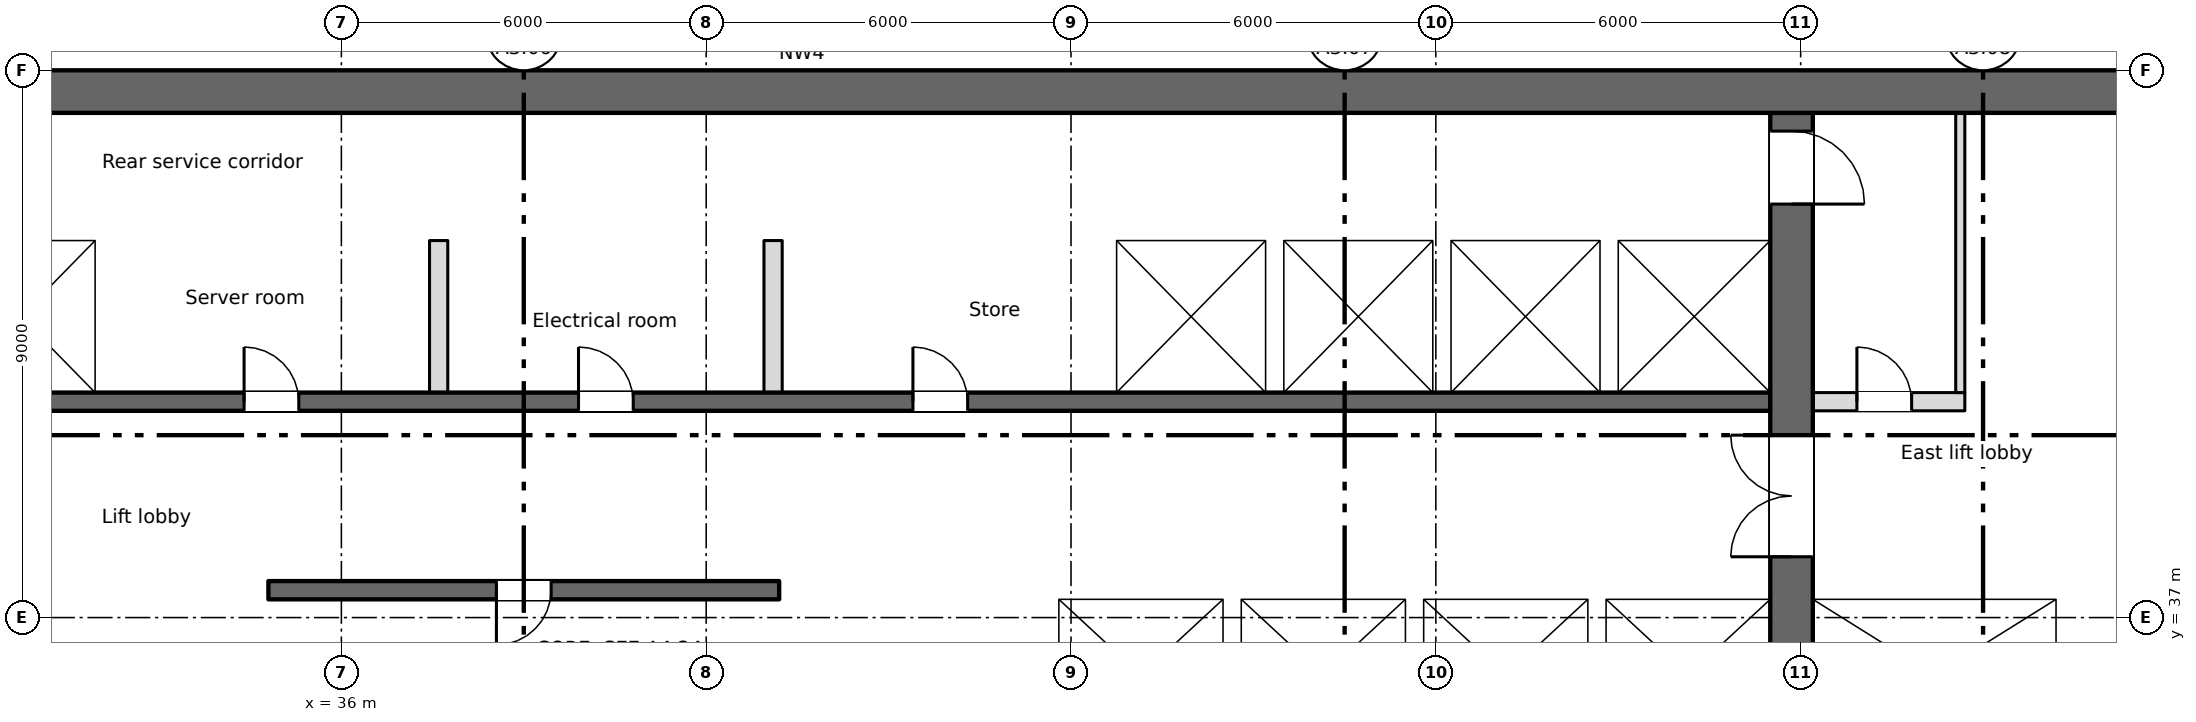
"""IFC4 building model, lengths in metres.
Left out: names, types, materials, properties, quantities, classifications, styles, units other than length and angle.
Written with IfcOpenShell. Run it as: python <this file> out.ifc"""

import sys

from ifc_helpers import new_model, si_unit, direction, frame, frame_2d, origin, place, context, subcontext, project, spatial, rectangle, extrude, element, fill, save


model = new_model("IFC4")
c1 = context("Model", 3, precision=1e-05, world=origin(), true_north=direction((0.0, 1.0)))
c2 = subcontext(c1, "Body", "Model", "MODEL_VIEW")
j1 = project(units=[si_unit("LENGTHUNIT", "METRE"), si_unit("PLANEANGLEUNIT", "RADIAN")], contexts=[c1])
p1 = place(None, origin())
s1 = spatial("IfcSite", under=j1, at=p1, CompositionType="ELEMENT")
p2 = place(p1, origin())
s2 = spatial("IfcBuilding", under=s1, at=p2, CompositionType="ELEMENT")
p3 = place(p2, frame((0.0, 0.0, 170.5)))
s3 = spatial("IfcBuildingStorey", under=s2, at=p3, CompositionType="ELEMENT", Elevation=170.5)
p4 = place(p3, frame((11.55, 45.65, 0.0), z_axis=(0.0, 0.0, 1.0), x_axis=(1.0, 0.0, 0.0)))
e1 = element("IfcWall", 1, at=p4, inside=s3, PredefinedType="SHEAR", context=c2, shape_type="SweptSolid", body=[
    extrude(rectangle(XDim=54.9, YDim=0.7, at=frame_2d((27.45, 0.0))), origin(), (0.0, 0.0, 1.0), 3.35),
])
p5 = place(p4, frame((1.2, 0.0, 0.6)))
e2 = element("IfcOpeningElement", 2, at=p5, cuts=e1, PredefinedType="OPENING", context=c2, shape_type="SweptSolid", body=[
    extrude(rectangle(XDim=0.6, YDim=2.4, at=frame_2d((0.3, 1.2))), frame((0.0, 0.36, 0.0), z_axis=(0.0, -1.0, 0.0), x_axis=(1.0, 0.0, 0.0)), (0.0, 0.0, 1.0), 0.72),
])
p6 = place(p3, frame((64.35, 34.8, 0.0), z_axis=(0.0, 0.0, 1.0), x_axis=(0.0, 1.0, 0.0)))
e3 = element("IfcWall", 3, at=p6, inside=s3, PredefinedType="SHEAR", context=c2, shape_type="SweptSolid", body=[
    extrude(rectangle(XDim=10.5, YDim=0.3, at=frame_2d((5.25, 0.0))), origin(), (0.0, 0.0, 1.0), 3.35),
])
p7 = place(p3, frame((59.85, 28.4, 0.0), z_axis=(0.0, 0.0, 1.0), x_axis=(0.0, 1.0, 0.0)))
e4 = element("IfcWall", 4, at=p7, inside=s3, PredefinedType="SHEAR", context=c2, shape_type="SweptSolid", body=[
    extrude(rectangle(XDim=16.9, YDim=0.7, at=frame_2d((8.45, 0.0))), origin(), (0.0, 0.0, 1.0), 3.35),
])
p8 = place(p7, frame((9.6, 0.0, 0.0)))
e5 = element("IfcOpeningElement", 5, at=p8, cuts=e4, PredefinedType="OPENING", context=c2, shape_type="SweptSolid", body=[
    extrude(rectangle(XDim=2.0, YDim=2.1, at=frame_2d((1.0, 1.05))), frame((0.0, 0.36, 0.0), z_axis=(0.0, -1.0, 0.0), x_axis=(1.0, 0.0, 0.0)), (0.0, 0.0, 1.0), 0.72),
])
p9 = place(p7, frame((15.4, 0.0, 0.0)))
e6 = element("IfcOpeningElement", 6, at=p9, cuts=e4, PredefinedType="OPENING", context=c2, shape_type="SweptSolid", body=[
    extrude(rectangle(XDim=1.2, YDim=2.1, at=frame_2d((0.6, 1.05))), frame((0.0, 0.36, 0.0), z_axis=(0.0, -1.0, 0.0), x_axis=(1.0, 0.0, 0.0)), (0.0, 0.0, 1.0), 0.72),
])
p10 = place(p3, frame((43.2, 37.45, 0.0), z_axis=(0.0, 0.0, 1.0), x_axis=(-1.0, 0.0, 0.0)))
e7 = element("IfcWall", 7, at=p10, inside=s3, PredefinedType="SHEAR", context=c2, shape_type="SweptSolid", body=[
    extrude(rectangle(XDim=8.4, YDim=0.3, at=frame_2d((4.2, 0.0))), origin(), (0.0, 0.0, 1.0), 3.35),
])
p11 = place(p10, frame((3.75, 0.0, 0.0)))
e8 = element("IfcOpeningElement", 8, at=p11, cuts=e7, PredefinedType="OPENING", context=c2, shape_type="SweptSolid", body=[
    extrude(rectangle(XDim=0.9, YDim=2.1, at=frame_2d((0.45, 1.05))), frame((0.0, 0.16, 0.0), z_axis=(0.0, -1.0, 0.0), x_axis=(1.0, 0.0, 0.0)), (0.0, 0.0, 1.0), 0.32),
])
p12 = place(p3, frame((47.3, 37.45, 0.0), z_axis=(0.0, 0.0, 1.0), x_axis=(1.0, 0.0, 0.0)))
e9 = element("IfcWall", 9, at=p12, inside=s3, PredefinedType="SHEAR", context=c2, shape_type="SweptSolid", body=[
    extrude(rectangle(XDim=12.2, YDim=0.3, at=frame_2d((6.1, 0.0))), origin(), (0.0, 0.0, 1.0), 3.35),
])
p13 = place(p12, frame((4.3, 0.0, 0.0)))
e10 = element("IfcOpeningElement", 10, at=p13, cuts=e9, PredefinedType="OPENING", context=c2, shape_type="SweptSolid", body=[
    extrude(rectangle(XDim=1.1, YDim=2.1, at=frame_2d((0.55, 1.05))), frame((0.0, 0.16, 0.0), z_axis=(0.0, -1.0, 0.0), x_axis=(1.0, 0.0, 0.0)), (0.0, 0.0, 1.0), 0.32),
])
p14 = place(p12, frame((7.3, 0.0, 0.0)))
e11 = element("IfcOpeningElement", 11, at=p14, cuts=e9, PredefinedType="OPENING", context=c2, shape_type="SweptSolid", body=[
    extrude(rectangle(XDim=1.1, YDim=2.1, at=frame_2d((0.55, 1.05))), frame((0.0, 0.16, 0.0), z_axis=(0.0, -1.0, 0.0), x_axis=(1.0, 0.0, 0.0)), (0.0, 0.0, 1.0), 0.32),
])
p15 = place(p12, frame((10.3, 0.0, 0.0)))
e12 = element("IfcOpeningElement", 12, at=p15, cuts=e9, PredefinedType="OPENING", context=c2, shape_type="SweptSolid", body=[
    extrude(rectangle(XDim=1.1, YDim=2.1, at=frame_2d((0.55, 1.05))), frame((0.0, 0.16, 0.0), z_axis=(0.0, -1.0, 0.0), x_axis=(1.0, 0.0, 0.0)), (0.0, 0.0, 1.0), 0.32),
])
p16 = place(p3, frame((60.2, 37.45, 0.0), z_axis=(0.0, 0.0, 1.0), x_axis=(1.0, 0.0, 0.0)))
e13 = element("IfcWall", 13, at=p16, inside=s3, PredefinedType="SHEAR", context=c2, shape_type="SweptSolid", body=[
    extrude(rectangle(XDim=4.0, YDim=0.3, at=frame_2d((2.0, 0.0))), origin(), (0.0, 0.0, 1.0), 3.35),
])
p17 = place(p16, frame((1.45, 0.0, 0.0)))
e14 = element("IfcOpeningElement", 14, at=p17, cuts=e13, PredefinedType="OPENING", context=c2, shape_type="SweptSolid", body=[
    extrude(rectangle(XDim=1.1, YDim=2.1, at=frame_2d((0.55, 1.05))), frame((0.0, 0.16, 0.0), z_axis=(0.0, -1.0, 0.0), x_axis=(1.0, 0.0, 0.0)), (0.0, 0.0, 1.0), 0.32),
])
for number, where, z_axis, x_axis in (
    (15, (34.95, 34.8, 0.0), (0.0, 0.0, 1.0), (0.0, 1.0, 0.0)),
    (16, (43.05, 34.8, 0.0), (0.0, 0.0, 1.0), (0.0, 1.0, 0.0)),
):
    element("IfcWall", number, at=place(p3, frame(where, z_axis=z_axis, x_axis=x_axis)), inside=s3, PredefinedType="SHEAR", context=c2, shape_type="SweptSolid", body=[
        extrude(rectangle(XDim=2.5, YDim=0.3, at=frame_2d((1.25, 0.0))), origin(), (0.0, 0.0, 1.0), 3.35),
    ])
p18 = place(p3, frame((47.55, 34.8, 0.0), z_axis=(0.0, 0.0, 1.0), x_axis=(0.0, 1.0, 0.0)))
e17 = element("IfcWall", 17, at=p18, inside=s3, PredefinedType="SHEAR", context=c2, shape_type="SweptSolid", body=[
    extrude(rectangle(XDim=2.5, YDim=0.5, at=frame_2d((1.25, 0.0))), origin(), (0.0, 0.0, 1.0), 3.35),
])
p19 = place(p3, frame((50.65, 34.8, 0.0), z_axis=(0.0, 0.0, 1.0), x_axis=(0.0, 1.0, 0.0)))
e18 = element("IfcWall", 18, at=p19, inside=s3, PredefinedType="SHEAR", context=c2, shape_type="SweptSolid", body=[
    extrude(rectangle(XDim=2.5, YDim=0.3, at=frame_2d((1.25, 0.0))), origin(), (0.0, 0.0, 1.0), 3.35),
])
p20 = place(p3, frame((18.5, 40.55, 0.0), z_axis=(0.0, 0.0, 1.0), x_axis=(1.0, 0.0, 0.0)))
e19 = element("IfcWall", 19, at=p20, inside=s3, PredefinedType="SHEAR", context=c2, shape_type="SweptSolid", body=[
    extrude(rectangle(XDim=41.0, YDim=0.3, at=frame_2d((20.5, 0.0))), origin(), (0.0, 0.0, 1.0), 3.35),
])
p21 = place(p20, frame((2.15, 0.0, 0.0)))
e20 = element("IfcOpeningElement", 20, at=p21, cuts=e19, PredefinedType="OPENING", context=c2, shape_type="SweptSolid", body=[
    extrude(rectangle(XDim=0.9, YDim=2.1, at=frame_2d((0.45, 1.05))), frame((0.0, 0.16, 0.0), z_axis=(0.0, -1.0, 0.0), x_axis=(1.0, 0.0, 0.0)), (0.0, 0.0, 1.0), 0.32),
])
p22 = place(p20, frame((15.9, 0.0, 0.0)))
e21 = element("IfcOpeningElement", 21, at=p22, cuts=e19, PredefinedType="OPENING", context=c2, shape_type="SweptSolid", body=[
    extrude(rectangle(XDim=0.9, YDim=2.1, at=frame_2d((0.45, 1.05))), frame((0.0, 0.16, 0.0), z_axis=(0.0, -1.0, 0.0), x_axis=(1.0, 0.0, 0.0)), (0.0, 0.0, 1.0), 0.32),
])
p23 = place(p20, frame((21.4, 0.0, 0.0)))
e22 = element("IfcOpeningElement", 22, at=p23, cuts=e19, PredefinedType="OPENING", context=c2, shape_type="SweptSolid", body=[
    extrude(rectangle(XDim=0.9, YDim=2.1, at=frame_2d((0.45, 1.05))), frame((0.0, 0.16, 0.0), z_axis=(0.0, -1.0, 0.0), x_axis=(1.0, 0.0, 0.0)), (0.0, 0.0, 1.0), 0.32),
])
p24 = place(p20, frame((26.9, 0.0, 0.0)))
e23 = element("IfcOpeningElement", 23, at=p24, cuts=e19, PredefinedType="OPENING", context=c2, shape_type="SweptSolid", body=[
    extrude(rectangle(XDim=0.9, YDim=2.1, at=frame_2d((0.45, 1.05))), frame((0.0, 0.16, 0.0), z_axis=(0.0, -1.0, 0.0), x_axis=(1.0, 0.0, 0.0)), (0.0, 0.0, 1.0), 0.32),
])
p25 = place(p20, frame((6.175, 0.0, 0.0)))
e24 = element("IfcOpeningElement", 24, at=p25, cuts=e19, PredefinedType="OPENING", context=c2, shape_type="SweptSolid", body=[
    extrude(rectangle(XDim=1.1, YDim=2.1, at=frame_2d((0.55, 1.05))), frame((0.0, 0.16, 0.0), z_axis=(0.0, -1.0, 0.0), x_axis=(1.0, 0.0, 0.0)), (0.0, 0.0, 1.0), 0.32),
])
p26 = place(p20, frame((8.925, 0.0, 0.0)))
e25 = element("IfcOpeningElement", 25, at=p26, cuts=e19, PredefinedType="OPENING", context=c2, shape_type="SweptSolid", body=[
    extrude(rectangle(XDim=1.1, YDim=2.1, at=frame_2d((0.55, 1.05))), frame((0.0, 0.16, 0.0), z_axis=(0.0, -1.0, 0.0), x_axis=(1.0, 0.0, 0.0)), (0.0, 0.0, 1.0), 0.32),
])
p27 = place(p20, frame((11.675, 0.0, 0.0)))
e26 = element("IfcOpeningElement", 26, at=p27, cuts=e19, PredefinedType="OPENING", context=c2, shape_type="SweptSolid", body=[
    extrude(rectangle(XDim=1.1, YDim=2.1, at=frame_2d((0.55, 1.05))), frame((0.0, 0.16, 0.0), z_axis=(0.0, -1.0, 0.0), x_axis=(1.0, 0.0, 0.0)), (0.0, 0.0, 1.0), 0.32),
])
p28 = place(p20, frame((30.925, 0.0, 0.0)))
e27 = element("IfcOpeningElement", 27, at=p28, cuts=e19, PredefinedType="OPENING", context=c2, shape_type="SweptSolid", body=[
    extrude(rectangle(XDim=1.1, YDim=2.1, at=frame_2d((0.55, 1.05))), frame((0.0, 0.16, 0.0), z_axis=(0.0, -1.0, 0.0), x_axis=(1.0, 0.0, 0.0)), (0.0, 0.0, 1.0), 0.32),
])
p29 = place(p20, frame((33.675, 0.0, 0.0)))
e28 = element("IfcOpeningElement", 28, at=p29, cuts=e19, PredefinedType="OPENING", context=c2, shape_type="SweptSolid", body=[
    extrude(rectangle(XDim=1.1, YDim=2.1, at=frame_2d((0.55, 1.05))), frame((0.0, 0.16, 0.0), z_axis=(0.0, -1.0, 0.0), x_axis=(1.0, 0.0, 0.0)), (0.0, 0.0, 1.0), 0.32),
])
p30 = place(p20, frame((36.375, 0.0, 0.0)))
e29 = element("IfcOpeningElement", 29, at=p30, cuts=e19, PredefinedType="OPENING", context=c2, shape_type="SweptSolid", body=[
    extrude(rectangle(XDim=1.2, YDim=2.1, at=frame_2d((0.6, 1.05))), frame((0.0, 0.16, 0.0), z_axis=(0.0, -1.0, 0.0), x_axis=(1.0, 0.0, 0.0)), (0.0, 0.0, 1.0), 0.32),
])
p31 = place(p20, frame((39.15, 0.0, 0.0)))
e30 = element("IfcOpeningElement", 30, at=p31, cuts=e19, PredefinedType="OPENING", context=c2, shape_type="SweptSolid", body=[
    extrude(rectangle(XDim=1.2, YDim=2.1, at=frame_2d((0.6, 1.05))), frame((0.0, 0.16, 0.0), z_axis=(0.0, -1.0, 0.0), x_axis=(1.0, 0.0, 0.0)), (0.0, 0.0, 1.0), 0.32),
])
p32 = place(p3, frame((18.5, 43.35, 0.0), z_axis=(0.0, 0.0, 1.0), x_axis=(1.0, 0.0, 0.0)))
e31 = element("IfcWall", 31, at=p32, inside=s3, PredefinedType="SHEAR", context=c2, shape_type="SweptSolid", body=[
    extrude(rectangle(XDim=41.0, YDim=0.3, at=frame_2d((20.5, 0.0))), origin(), (0.0, 0.0, 1.0), 3.35),
])
p33 = place(p3, frame((60.2, 40.55, 0.0), z_axis=(0.0, 0.0, 1.0), x_axis=(1.0, 0.0, 0.0)))
e32 = element("IfcWall", 32, at=p33, inside=s3, PredefinedType="PARTITIONING", context=c2, shape_type="SweptSolid", body=[
    extrude(rectangle(XDim=2.5, YDim=0.3, at=frame_2d((1.25, 0.0))), origin(), (0.0, 0.0, 1.0), 3.35),
])
p34 = place(p33, frame((0.725, 0.0, 0.0)))
e33 = element("IfcOpeningElement", 33, at=p34, cuts=e32, PredefinedType="OPENING", context=c2, shape_type="SweptSolid", body=[
    extrude(rectangle(XDim=0.9, YDim=2.1, at=frame_2d((0.45, 1.05))), frame((0.0, 0.16, 0.0), z_axis=(0.0, -1.0, 0.0), x_axis=(1.0, 0.0, 0.0)), (0.0, 0.0, 1.0), 0.32),
])
for number, where, z_axis, x_axis in (
    (34, (53.65, 34.8, 0.0), (0.0, 0.0, 1.0), (0.0, 1.0, 0.0)),
    (35, (56.65, 34.8, 0.0), (0.0, 0.0, 1.0), (0.0, 1.0, 0.0)),
    (36, (32.1, 40.7, 0.0), (0.0, 0.0, 1.0), (0.0, 1.0, 0.0)),
    (37, (48.6, 40.7, 0.0), (0.0, 0.0, 1.0), (0.0, 1.0, 0.0)),
    (38, (51.35, 40.7, 0.0), (0.0, 0.0, 1.0), (0.0, 1.0, 0.0)),
    (39, (54.1, 40.7, 0.0), (0.0, 0.0, 1.0), (0.0, 1.0, 0.0)),
    (40, (56.85, 40.7, 0.0), (0.0, 0.0, 1.0), (0.0, 1.0, 0.0)),
):
    element("IfcWall", number, at=place(p3, frame(where, z_axis=z_axis, x_axis=x_axis)), inside=s3, PredefinedType="SHEAR", context=c2, shape_type="SweptSolid", body=[
        extrude(rectangle(XDim=2.5, YDim=0.3, at=frame_2d((1.25, 0.0))), origin(), (0.0, 0.0, 1.0), 3.35),
    ])
p35 = place(p3, frame((62.625, 40.7, 0.0), z_axis=(0.0, 0.0, 1.0), x_axis=(0.0, 1.0, 0.0)))
e41 = element("IfcWall", 41, at=p35, inside=s3, PredefinedType="PARTITIONING", context=c2, shape_type="SweptSolid", body=[
    extrude(rectangle(XDim=4.6, YDim=0.15, at=frame_2d((2.3, 0.0))), origin(), (0.0, 0.0, 1.0), 3.35),
])
for number, where, z_axis, x_axis in (
    (42, (37.6, 40.7, 0.0), (0.0, 0.0, 1.0), (0.0, 1.0, 0.0)),
    (43, (43.1, 40.7, 0.0), (0.0, 0.0, 1.0), (0.0, 1.0, 0.0)),
):
    element("IfcWall", number, at=place(p3, frame(where, z_axis=z_axis, x_axis=x_axis)), inside=s3, PredefinedType="PARTITIONING", context=c2, shape_type="SweptSolid", body=[
        extrude(rectangle(XDim=2.5, YDim=0.3, at=frame_2d((1.25, 0.0))), origin(), (0.0, 0.0, 1.0), 3.35),
    ])
p36 = place(p34, origin())
e44 = element("IfcDoor", 44, at=p36, inside=s3, OperationType="SINGLE_SWING_LEFT", PredefinedType="DOOR", context=c2, shape_type="SweptSolid", body=[
    extrude(rectangle(XDim=0.9, YDim=2.1, at=frame_2d((0.45, 1.05))), frame((0.0, 0.025, 0.0), z_axis=(0.0, -1.0, 0.0), x_axis=(1.0, 0.0, 0.0)), (0.0, 0.0, 1.0), 0.05),
])
fill(e33, e44)
p37 = place(p11, origin())
e45 = element("IfcDoor", 45, at=p37, inside=s3, OperationType="SINGLE_SWING_RIGHT", PredefinedType="DOOR", context=c2, shape_type="SweptSolid", body=[
    extrude(rectangle(XDim=0.9, YDim=2.1, at=frame_2d((0.45, 1.05))), frame((0.0, 0.025, 0.0), z_axis=(0.0, -1.0, 0.0), x_axis=(1.0, 0.0, 0.0)), (0.0, 0.0, 1.0), 0.05),
])
fill(e8, e45)
p38 = place(p22, origin())
e46 = element("IfcDoor", 46, at=p38, inside=s3, OperationType="SINGLE_SWING_LEFT", PredefinedType="DOOR", context=c2, shape_type="SweptSolid", body=[
    extrude(rectangle(XDim=0.9, YDim=2.1, at=frame_2d((0.45, 1.05))), frame((0.0, 0.025, 0.0), z_axis=(0.0, -1.0, 0.0), x_axis=(1.0, 0.0, 0.0)), (0.0, 0.0, 1.0), 0.05),
])
fill(e21, e46)
p39 = place(p23, origin())
e47 = element("IfcDoor", 47, at=p39, inside=s3, OperationType="SINGLE_SWING_LEFT", PredefinedType="DOOR", context=c2, shape_type="SweptSolid", body=[
    extrude(rectangle(XDim=0.9, YDim=2.1, at=frame_2d((0.45, 1.05))), frame((0.0, 0.025, 0.0), z_axis=(0.0, -1.0, 0.0), x_axis=(1.0, 0.0, 0.0)), (0.0, 0.0, 1.0), 0.05),
])
fill(e22, e47)
p40 = place(p24, origin())
e48 = element("IfcDoor", 48, at=p40, inside=s3, OperationType="SINGLE_SWING_LEFT", PredefinedType="DOOR", context=c2, shape_type="SweptSolid", body=[
    extrude(rectangle(XDim=0.9, YDim=2.1, at=frame_2d((0.45, 1.05))), frame((0.0, 0.025, 0.0), z_axis=(0.0, -1.0, 0.0), x_axis=(1.0, 0.0, 0.0)), (0.0, 0.0, 1.0), 0.05),
])
fill(e23, e48)
p41 = place(p13, origin())
e49 = element("IfcDoor", 49, at=p41, inside=s3, OperationType="SLIDING_TO_LEFT", PredefinedType="DOOR", context=c2, shape_type="SweptSolid", body=[
    extrude(rectangle(XDim=1.1, YDim=2.1, at=frame_2d((0.55, 1.05))), frame((0.0, 0.025, 0.0), z_axis=(0.0, -1.0, 0.0), x_axis=(1.0, 0.0, 0.0)), (0.0, 0.0, 1.0), 0.05),
])
fill(e10, e49)
p42 = place(p14, origin())
e50 = element("IfcDoor", 50, at=p42, inside=s3, OperationType="SLIDING_TO_LEFT", PredefinedType="DOOR", context=c2, shape_type="SweptSolid", body=[
    extrude(rectangle(XDim=1.1, YDim=2.1, at=frame_2d((0.55, 1.05))), frame((0.0, 0.025, 0.0), z_axis=(0.0, -1.0, 0.0), x_axis=(1.0, 0.0, 0.0)), (0.0, 0.0, 1.0), 0.05),
])
fill(e11, e50)
p43 = place(p15, origin())
e51 = element("IfcDoor", 51, at=p43, inside=s3, OperationType="SLIDING_TO_LEFT", PredefinedType="DOOR", context=c2, shape_type="SweptSolid", body=[
    extrude(rectangle(XDim=1.1, YDim=2.1, at=frame_2d((0.55, 1.05))), frame((0.0, 0.025, 0.0), z_axis=(0.0, -1.0, 0.0), x_axis=(1.0, 0.0, 0.0)), (0.0, 0.0, 1.0), 0.05),
])
fill(e12, e51)
p44 = place(p27, origin())
e52 = element("IfcDoor", 52, at=p44, inside=s3, OperationType="SLIDING_TO_LEFT", PredefinedType="DOOR", context=c2, shape_type="SweptSolid", body=[
    extrude(rectangle(XDim=1.1, YDim=2.1, at=frame_2d((0.55, 1.05))), frame((0.0, 0.025, 0.0), z_axis=(0.0, -1.0, 0.0), x_axis=(1.0, 0.0, 0.0)), (0.0, 0.0, 1.0), 0.05),
])
fill(e26, e52)
p45 = place(p28, origin())
e53 = element("IfcDoor", 53, at=p45, inside=s3, OperationType="SLIDING_TO_LEFT", PredefinedType="DOOR", context=c2, shape_type="SweptSolid", body=[
    extrude(rectangle(XDim=1.1, YDim=2.1, at=frame_2d((0.55, 1.05))), frame((0.0, 0.025, 0.0), z_axis=(0.0, -1.0, 0.0), x_axis=(1.0, 0.0, 0.0)), (0.0, 0.0, 1.0), 0.05),
])
fill(e27, e53)
p46 = place(p29, origin())
e54 = element("IfcDoor", 54, at=p46, inside=s3, OperationType="SLIDING_TO_LEFT", PredefinedType="DOOR", context=c2, shape_type="SweptSolid", body=[
    extrude(rectangle(XDim=1.1, YDim=2.1, at=frame_2d((0.55, 1.05))), frame((0.0, 0.025, 0.0), z_axis=(0.0, -1.0, 0.0), x_axis=(1.0, 0.0, 0.0)), (0.0, 0.0, 1.0), 0.05),
])
fill(e28, e54)
p47 = place(p30, origin())
e55 = element("IfcDoor", 55, at=p47, inside=s3, OperationType="SLIDING_TO_LEFT", PredefinedType="DOOR", context=c2, shape_type="SweptSolid", body=[
    extrude(rectangle(XDim=1.2, YDim=2.1, at=frame_2d((0.6, 1.05))), frame((0.0, 0.025, 0.0), z_axis=(0.0, -1.0, 0.0), x_axis=(1.0, 0.0, 0.0)), (0.0, 0.0, 1.0), 0.05),
])
fill(e29, e55)
p48 = place(p31, origin())
e56 = element("IfcDoor", 56, at=p48, inside=s3, OperationType="SLIDING_TO_LEFT", PredefinedType="DOOR", context=c2, shape_type="SweptSolid", body=[
    extrude(rectangle(XDim=1.2, YDim=2.1, at=frame_2d((0.6, 1.05))), frame((0.0, 0.025, 0.0), z_axis=(0.0, -1.0, 0.0), x_axis=(1.0, 0.0, 0.0)), (0.0, 0.0, 1.0), 0.05),
])
fill(e30, e56)
p49 = place(p17, origin())
e57 = element("IfcDoor", 57, at=p49, inside=s3, OperationType="SLIDING_TO_LEFT", PredefinedType="DOOR", context=c2, shape_type="SweptSolid", body=[
    extrude(rectangle(XDim=1.1, YDim=2.1, at=frame_2d((0.55, 1.05))), frame((0.0, 0.025, 0.0), z_axis=(0.0, -1.0, 0.0), x_axis=(1.0, 0.0, 0.0)), (0.0, 0.0, 1.0), 0.05),
])
fill(e14, e57)
p50 = place(p8, origin())
e58 = element("IfcDoor", 58, at=p50, inside=s3, OperationType="DOUBLE_DOOR_SINGLE_SWING", PredefinedType="DOOR", context=c2, shape_type="SweptSolid", body=[
    extrude(rectangle(XDim=2.0, YDim=2.1, at=frame_2d((1.0, 1.05))), frame((0.0, 0.025, 0.0), z_axis=(0.0, -1.0, 0.0), x_axis=(1.0, 0.0, 0.0)), (0.0, 0.0, 1.0), 0.05),
])
fill(e5, e58)
p51 = place(p9, origin())
e59 = element("IfcDoor", 59, at=p51, inside=s3, OperationType="SINGLE_SWING_LEFT", PredefinedType="DOOR", context=c2, shape_type="SweptSolid", body=[
    extrude(rectangle(XDim=1.2, YDim=2.1, at=frame_2d((0.6, 1.05))), frame((0.0, 0.025, 0.0), z_axis=(0.0, -1.0, 0.0), x_axis=(1.0, 0.0, 0.0)), (0.0, 0.0, 1.0), 0.05),
])
fill(e6, e59)
save(model, sys.argv[1])
